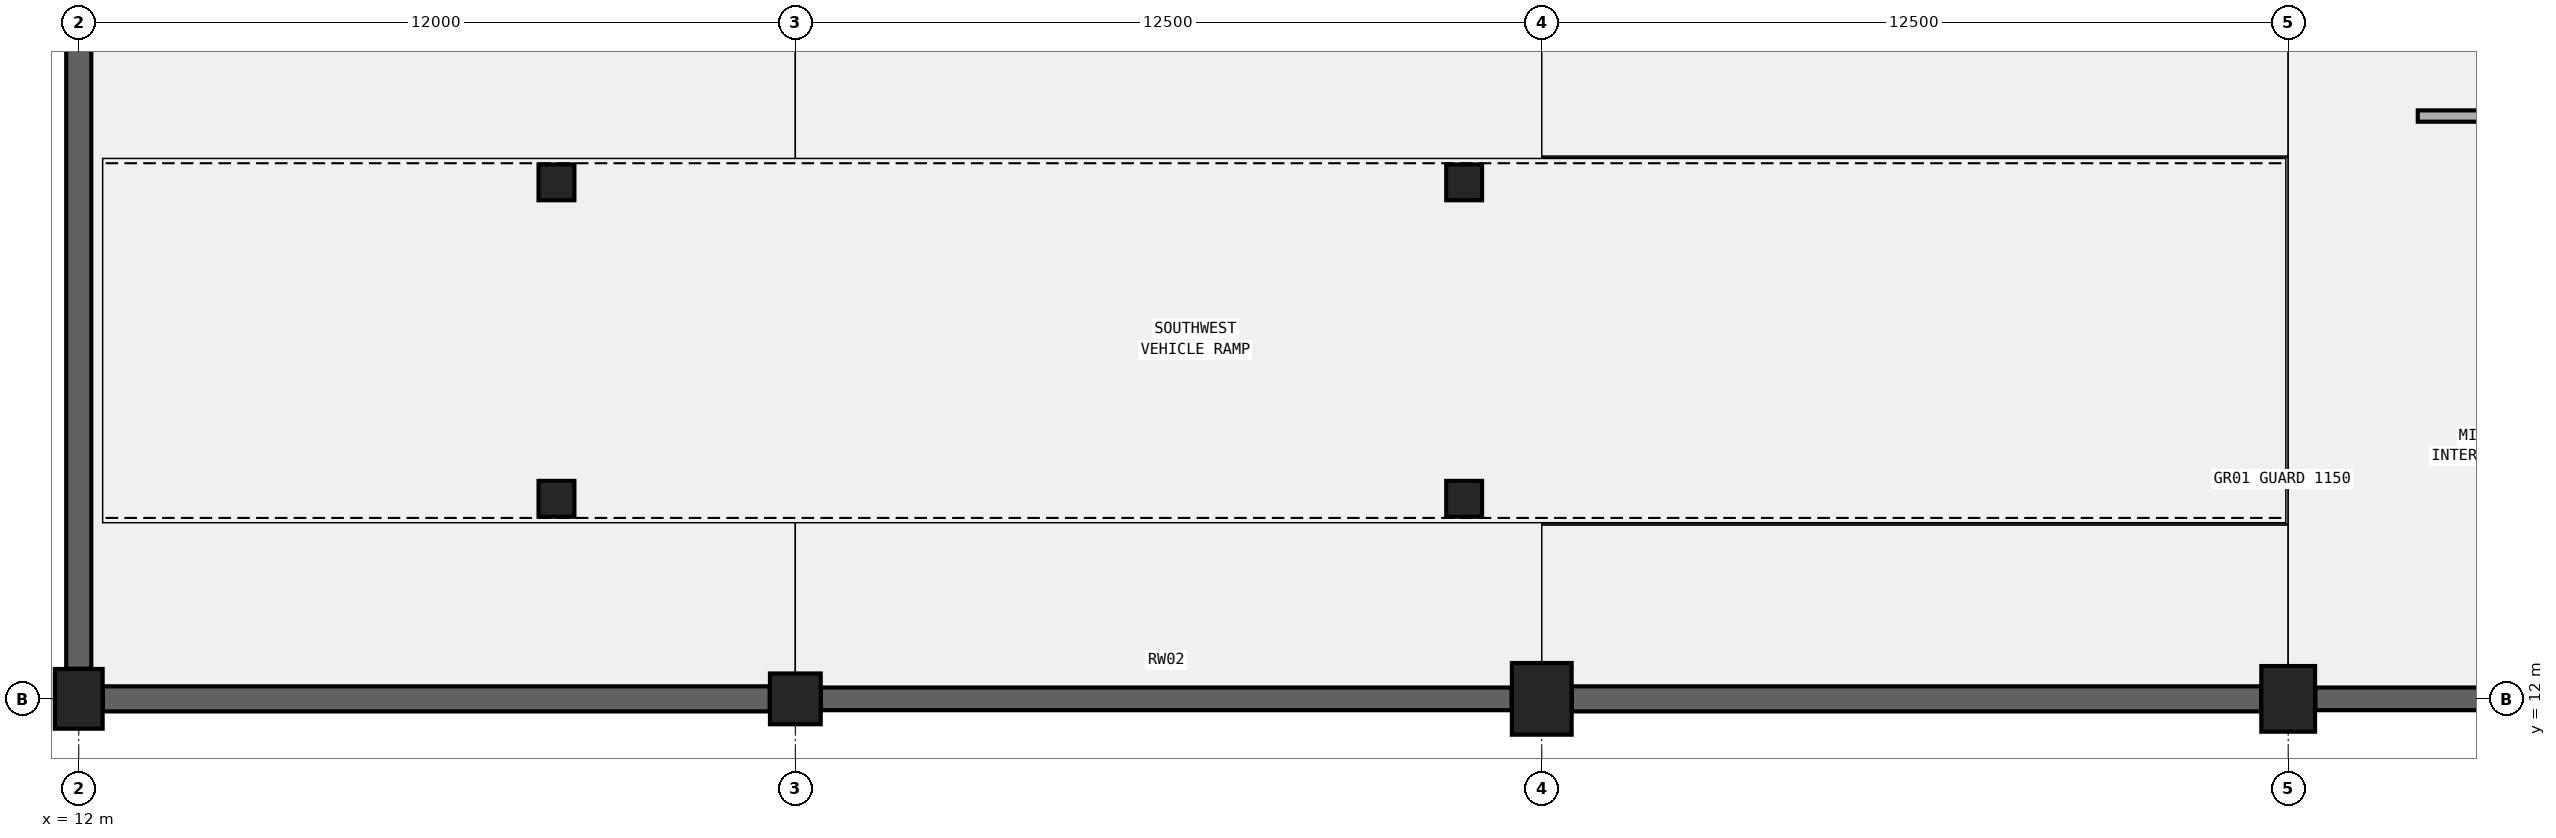
"""IFC4 building model, lengths in metres.
Left out: names, types, materials, properties, quantities, classifications, styles, units other than length and angle.
Written with IfcOpenShell. Run it as: python <this file> out.ifc"""

import sys

from ifc_helpers import new_model, si_unit, direction, frame, frame_2d, origin, origin_2d, place, context, subcontext, project, spatial, rectangle, circle, extrude, element, save


model = new_model("IFC4")
c1 = context("Model", 3, precision=1e-05, world=origin(), true_north=direction((0.0, 1.0)))
c2 = subcontext(c1, "Body", "Model", "MODEL_VIEW")
j1 = project(units=[si_unit("LENGTHUNIT", "METRE"), si_unit("PLANEANGLEUNIT", "RADIAN")], contexts=[c1])
p1 = place(None, origin())
s1 = spatial("IfcSite", under=j1, at=p1, CompositionType="ELEMENT")
p2 = place(p1, origin())
s2 = spatial("IfcBuilding", under=s1, at=p2, CompositionType="ELEMENT")
p3 = place(p2, frame((0.0, 0.0, -4.8)))
s3 = spatial("IfcBuildingStorey", under=s2, at=p3, CompositionType="ELEMENT", Elevation=-4.8)
p4 = place(p3, frame((12.0, 12.0, 0.0), z_axis=(0.0, 0.0, 1.0), x_axis=(1.0, 0.0, 0.0)))
e1 = element("IfcColumn", 1, at=p4, inside=s3, PredefinedType="COLUMN", context=c2, shape_type="SweptSolid", body=[
    extrude(rectangle(XDim=0.8, YDim=1.0, at=origin_2d()), origin(), (0.0, 0.0, 1.0), 4.8),
])
p5 = place(p3, frame((24.0, 12.0, 0.0), z_axis=(0.0, 0.0, 1.0), x_axis=(1.0, 0.0, 0.0)))
e2 = element("IfcColumn", 2, at=p5, inside=s3, PredefinedType="COLUMN", context=c2, shape_type="SweptSolid", body=[
    extrude(circle(Radius=0.425, at=origin_2d()), origin(), (0.0, 0.0, 1.0), 4.8),
])
p6 = place(p3, frame((36.5, 12.0, 0.0), z_axis=(0.0, 0.0, 1.0), x_axis=(1.0, 0.0, 0.0)))
e3 = element("IfcColumn", 3, at=p6, inside=s3, PredefinedType="COLUMN", context=c2, shape_type="SweptSolid", body=[
    extrude(rectangle(XDim=1.0, YDim=1.2, at=origin_2d()), origin(), (0.0, 0.0, 1.0), 4.8),
])
p7 = place(p3, frame((49.0, 12.0, 0.0), z_axis=(0.0, 0.0, 1.0), x_axis=(1.0, 0.0, 0.0)))
e4 = element("IfcColumn", 4, at=p7, inside=s3, PredefinedType="COLUMN", context=c2, shape_type="SweptSolid", body=[
    extrude(rectangle(XDim=0.9, YDim=1.1, at=origin_2d()), origin(), (0.0, 0.0, 1.0), 4.8),
])
p8 = place(p3, frame((12.404, 12.0, 0.0), z_axis=(0.0, 0.0, 1.0), x_axis=(1.0, 0.0, 0.0)))
e5 = element("IfcWall", 5, at=p8, inside=s3, PredefinedType="STANDARD", context=c2, shape_type="SweptSolid", body=[
    extrude(rectangle(XDim=11.167, YDim=0.42, at=frame_2d((5.583, 0.0))), origin(), (0.0, 0.0, 1.0), 4.46),
])
p9 = place(p3, frame((12.0, 12.504, 0.0), z_axis=(0.0, 0.0, 1.0), x_axis=(0.0, 1.0, 0.0)))
e6 = element("IfcWall", 6, at=p9, inside=s3, PredefinedType="STANDARD", context=c2, shape_type="SweptSolid", body=[
    extrude(rectangle(XDim=11.067, YDim=0.42, at=frame_2d((5.534, 0.0))), origin(), (0.0, 0.0, 1.0), 4.46),
])
p10 = place(p3, frame((24.429, 12.0, 0.0), z_axis=(0.0, 0.0, 1.0), x_axis=(1.0, 0.0, 0.0)))
e7 = element("IfcWall", 7, at=p10, inside=s3, PredefinedType="STANDARD", context=c2, shape_type="SweptSolid", body=[
    extrude(rectangle(XDim=11.567, YDim=0.38, at=frame_2d((5.784, 0.0))), origin(), (0.0, 0.0, 1.0), 4.46),
])
p11 = place(p3, frame((37.004, 12.0, 0.0), z_axis=(0.0, 0.0, 1.0), x_axis=(1.0, 0.0, 0.0)))
e8 = element("IfcWall", 8, at=p11, inside=s3, PredefinedType="STANDARD", context=c2, shape_type="SweptSolid", body=[
    extrude(rectangle(XDim=11.542, YDim=0.42, at=frame_2d((5.771, 0.0))), origin(), (0.0, 0.0, 1.0), 4.46),
])
p12 = place(p3, frame((49.454, 12.0, 0.0), z_axis=(0.0, 0.0, 1.0), x_axis=(1.0, 0.0, 0.0)))
e9 = element("IfcWall", 9, at=p12, inside=s3, PredefinedType="STANDARD", context=c2, shape_type="SweptSolid", body=[
    extrude(rectangle(XDim=11.642, YDim=0.38, at=frame_2d((5.821, 0.0))), origin(), (0.0, 0.0, 1.0), 4.46),
])
for number, where, z_axis, x_axis in (
    (10, (20.0, 15.35, 0.0), (0.0, 0.0, 1.0), (1.0, 0.0, 0.0)),
    (11, (20.0, 20.65, 0.0), (0.0, 0.0, 1.0), (1.0, 0.0, 0.0)),
):
    element("IfcColumn", number, at=place(p3, frame(where, z_axis=z_axis, x_axis=x_axis)), inside=s3, PredefinedType="COLUMN", context=c2, shape_type="SweptSolid", body=[
        extrude(rectangle(XDim=0.6, YDim=0.6, at=origin_2d()), origin(), (0.0, 0.0, 1.0), 3.522),
    ])
for number, where, z_axis, x_axis in (
    (12, (35.2, 15.35, -0.3), (0.0, 0.0, 1.0), (1.0, 0.0, 0.0)),
    (13, (35.2, 20.65, -0.3), (0.0, 0.0, 1.0), (1.0, 0.0, 0.0)),
):
    element("IfcColumn", number, at=place(p3, frame(where, z_axis=z_axis, x_axis=x_axis)), inside=s3, PredefinedType="COLUMN", context=c2, shape_type="SweptSolid", body=[
        extrude(rectangle(XDim=0.6, YDim=0.6, at=origin_2d()), origin(), (0.0, 0.0, 1.0), 1.827),
    ])
p13 = place(p3, frame((51.17, 21.76, 0.0), z_axis=(0.0, 0.0, 1.0), x_axis=(1.0, 0.0, 0.0)))
e14 = element("IfcWall", 14, at=p13, inside=s3, PredefinedType="PARTITIONING", context=c2, shape_type="SweptSolid", body=[
    extrude(rectangle(XDim=10.17, YDim=0.19, at=frame_2d((5.085, 0.0))), origin(), (0.0, 0.0, 1.0), 3.92),
])
p14 = place(p13, frame((5.56, 0.0, 0.0), z_axis=(0.0, 0.0, 1.0), x_axis=(-1.0, 0.0, 0.0)))
e15 = element("IfcOpeningElement", 15, at=p14, cuts=e14, PredefinedType="OPENING", context=c2, shape_type="SweptSolid", body=[
    extrude(rectangle(XDim=0.95, YDim=2.12, at=frame_2d((0.475, 1.06))), frame((0.0, 0.105, 0.0), z_axis=(0.0, -1.0, 0.0), x_axis=(1.0, 0.0, 0.0)), (0.0, 0.0, 1.0), 0.21),
])
save(model, sys.argv[1])
